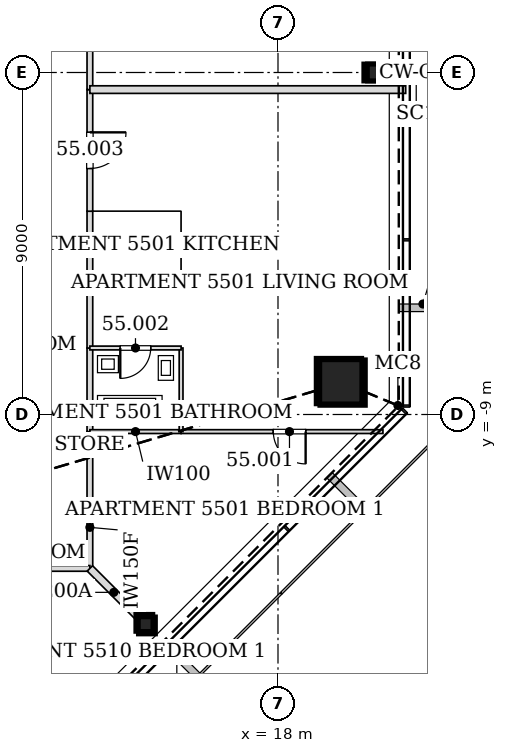
"""IFC4 building model, lengths in metres.
Left out: names, types, materials, properties, quantities, classifications, styles, units other than length and angle.
Written with IfcOpenShell. Run it as: python <this file> out.ifc"""

import sys

from ifc_helpers import new_model, si_unit, direction, frame, frame_2d, origin, origin_2d, place, context, subcontext, project, spatial, rectangle, hollow_rectangle, extrude, element, fill, save


model = new_model("IFC4")
c1 = context("Model", 3, precision=1e-05, world=origin(), true_north=direction((0.0, 1.0)))
c2 = subcontext(c1, "Body", "Model", "MODEL_VIEW")
j1 = project(units=[si_unit("LENGTHUNIT", "METRE"), si_unit("PLANEANGLEUNIT", "RADIAN")], contexts=[c1])
p1 = place(None, origin())
s1 = spatial("IfcSite", under=j1, at=p1, CompositionType="ELEMENT")
p2 = place(p1, origin())
s2 = spatial("IfcBuilding", under=s1, at=p2, CompositionType="ELEMENT")
p3 = place(p2, frame((0.0, 0.0, 234.6)))
s3 = spatial("IfcBuildingStorey", under=s2, at=p3, CompositionType="ELEMENT", Elevation=234.6)
p4 = place(p3, frame((19.7, -8.16, 0.0), z_axis=(-0.02827915051, 0.01169924247, 0.999531598986), x_axis=(-0.382282742426, -0.924045401938, 0.0)))
e1 = element("IfcColumn", 1, at=p4, inside=s3, PredefinedType="COLUMN", context=c2, shape_type="SweptSolid", body=[
    extrude(hollow_rectangle(XDim=1.2, YDim=1.2, WallThickness=0.055, at=origin_2d()), origin(), (0.0, 0.0, 1.0), 3.402),
])
for number, where, z_axis, x_axis in (
    (2, (20.578, 0.0, 0.0), (-0.028, 0.0, 1.0), (0.0, -1.0, 0.0)),
    (3, (14.551, -14.551, 0.0), (-0.02, 0.02, 1.0), (-0.707, -0.707, 0.0)),
):
    element("IfcColumn", number, at=place(p3, frame(where, z_axis=z_axis, x_axis=x_axis)), inside=s3, PredefinedType="COLUMN", context=c2, shape_type="SweptSolid", body=[
        extrude(hollow_rectangle(XDim=0.45, YDim=0.45, WallThickness=0.02, at=origin_2d()), origin(), (0.0, 0.0, 1.0), 3.401),
    ])
p5 = place(p3, frame((13.05, -13.05, 0.0), z_axis=(0.0, 0.0, 1.0), x_axis=(0.0, 1.0, 0.0)))
e4 = element("IfcWall", 4, at=p5, inside=s3, PredefinedType="PARTITIONING", context=c2, shape_type="SweptSolid", body=[
    extrude(rectangle(XDim=3.601, YDim=0.15, at=frame_2d((1.801, 0.0))), origin(), (0.0, 0.0, 1.0), 2.344),
])
p6 = place(p3, frame((13.05, -9.451, 0.0), z_axis=(0.0, 0.0, 1.0), x_axis=(0.0, 1.0, 0.0)))
e5 = element("IfcWall", 5, at=p6, inside=s3, PredefinedType="PARTITIONING", context=c2, shape_type="SweptSolid", body=[
    extrude(rectangle(XDim=2.202, YDim=0.15, at=frame_2d((1.101, 0.0))), origin(), (0.0, 0.0, 1.0), 2.73),
])
for number, where, z_axis, x_axis in (
    (6, (13.05, -5.451, 0.0), (0.0, 0.0, 1.0), (0.0, 1.0, 0.0)),
    (7, (13.05, -7.251, 0.0), (0.0, 0.0, 1.0), (0.0, 1.0, 0.0)),
):
    element("IfcWall", number, at=place(p3, frame(where, z_axis=z_axis, x_axis=x_axis)), inside=s3, PredefinedType="PARTITIONING", context=c2, shape_type="SweptSolid", body=[
        extrude(rectangle(XDim=1.802, YDim=0.15, at=frame_2d((0.901, 0.0))), origin(), (0.0, 0.0, 1.0), 2.73),
    ])
p7 = place(p3, frame((13.05, -3.651, 0.0), z_axis=(0.0, 0.0, 1.0), x_axis=(0.0, 1.0, 0.0)))
e8 = element("IfcWall", 8, at=p7, inside=s3, PredefinedType="PARTITIONING", context=c2, shape_type="SweptSolid", body=[
    extrude(rectangle(XDim=3.202, YDim=0.15, at=frame_2d((1.601, 0.0))), origin(), (0.0, 0.0, 1.0), 2.73),
])
p8 = place(p7, frame((1.126, 0.0, 0.0)))
e9 = element("IfcOpeningElement", 9, at=p8, cuts=e8, PredefinedType="OPENING", context=c2, shape_type="SweptSolid", body=[
    extrude(rectangle(XDim=0.95, YDim=2.1, at=frame_2d((0.475, 1.05))), frame((0.0, 0.085, 0.0), z_axis=(0.0, -1.0, 0.0), x_axis=(1.0, 0.0, 0.0)), (0.0, 0.0, 1.0), 0.17),
])
p9 = place(p3, frame((13.05, -0.451, 0.0), z_axis=(0.0, 0.0, 1.0), x_axis=(0.0, 1.0, 0.0)))
e10 = element("IfcWall", 10, at=p9, inside=s3, PredefinedType="PARTITIONING", context=c2, shape_type="SweptSolid", body=[
    extrude(rectangle(XDim=4.102, YDim=0.15, at=frame_2d((2.051, 0.0))), origin(), (0.0, 0.0, 1.0), 2.331),
])
p10 = place(p3, frame((9.899, -13.05, 0.0), z_axis=(0.0, 0.0, 1.0), x_axis=(1.0, 0.0, 0.0)))
e11 = element("IfcWall", 11, at=p10, inside=s3, PredefinedType="PARTITIONING", context=c2, shape_type="SweptSolid", body=[
    extrude(rectangle(XDim=3.151, YDim=0.15, at=frame_2d((1.576, 0.0))), origin(), (0.0, 0.0, 1.0), 2.344),
])
p11 = place(p3, frame((15.451, -9.45, 0.0), z_axis=(0.0, 0.0, 1.0), x_axis=(-1.0, 0.0, 0.0)))
e12 = element("IfcWall", 12, at=p11, inside=s3, PredefinedType="PARTITIONING", context=c2, shape_type="SweptSolid", body=[
    extrude(rectangle(XDim=2.401, YDim=0.1, at=frame_2d((1.2, 0.0))), origin(), (0.0, 0.0, 1.0), 2.344),
])
p12 = place(p3, frame((20.762, -9.45, 0.0), z_axis=(0.0, 0.0, 1.0), x_axis=(-1.0, 0.0, 0.0)))
e13 = element("IfcWall", 13, at=p12, inside=s3, PredefinedType="PARTITIONING", context=c2, shape_type="SweptSolid", body=[
    extrude(rectangle(XDim=5.313, YDim=0.1, at=frame_2d((2.656, 0.0))), origin(), (0.0, 0.0, 1.0), 2.344),
])
p13 = place(p12, frame((2.034, 0.0, 0.0)))
e14 = element("IfcOpeningElement", 14, at=p13, cuts=e13, PredefinedType="OPENING", context=c2, shape_type="SweptSolid", body=[
    extrude(rectangle(XDim=0.85, YDim=2.1, at=frame_2d((0.425, 1.05))), frame((0.0, 0.06, 0.0), z_axis=(0.0, -1.0, 0.0), x_axis=(1.0, 0.0, 0.0)), (0.0, 0.0, 1.0), 0.12),
])
p14 = place(p3, frame((13.05, -13.05, 0.0), z_axis=(0.0, 0.0, 1.0), x_axis=(0.707106781187, -0.707106781187, 0.0)))
e15 = element("IfcWall", 15, at=p14, inside=s3, PredefinedType="PARTITIONING", context=c2, shape_type="SweptSolid", body=[
    extrude(rectangle(XDim=1.782, YDim=0.2, at=frame_2d((0.891, 0.0))), origin(), (0.0, 0.0, 1.0), 2.583),
])
p15 = place(p3, frame((15.45, -9.45, 0.0), z_axis=(0.0, 0.0, 1.0), x_axis=(0.0, 1.0, 0.0)))
e16 = element("IfcWall", 16, at=p15, inside=s3, PredefinedType="PARTITIONING", context=c2, shape_type="SweptSolid", body=[
    extrude(rectangle(XDim=2.2, YDim=0.1, at=frame_2d((1.1, 0.0))), origin(), (0.0, 0.0, 1.0), 2.344),
])
p16 = place(p3, frame((15.45, -7.25, 0.0), z_axis=(0.0, 0.0, 1.0), x_axis=(-1.0, 0.0, 0.0)))
e17 = element("IfcWall", 17, at=p16, inside=s3, PredefinedType="PARTITIONING", context=c2, shape_type="SweptSolid", body=[
    extrude(rectangle(XDim=2.4, YDim=0.1, at=frame_2d((1.2, 0.0))), origin(), (0.0, 0.0, 1.0), 2.73),
])
p17 = place(p16, frame((0.8, 0.0, 0.0)))
e18 = element("IfcOpeningElement", 18, at=p17, cuts=e17, PredefinedType="OPENING", context=c2, shape_type="SweptSolid", body=[
    extrude(rectangle(XDim=0.8, YDim=2.1, at=frame_2d((0.4, 1.05))), frame((0.0, 0.06, 0.0), z_axis=(0.0, -1.0, 0.0), x_axis=(1.0, 0.0, 0.0)), (0.0, 0.0, 1.0), 0.12),
])
p18 = place(p3, frame((21.36, -0.45, 0.0), z_axis=(0.0, 0.0, 1.0), x_axis=(-1.0, 0.0, 0.0)))
e19 = element("IfcWall", 19, at=p18, inside=s3, PredefinedType="PARTITIONING", context=c2, shape_type="SweptSolid", body=[
    extrude(rectangle(XDim=8.31, YDim=0.2, at=frame_2d((4.155, 0.0))), origin(), (0.0, 0.0, 1.0), 2.662),
])
p19 = place(p13, origin())
e20 = element("IfcDoor", 20, at=p19, inside=s3, OperationType="SINGLE_SWING_LEFT", PredefinedType="DOOR", context=c2, shape_type="SweptSolid", body=[
    extrude(rectangle(XDim=0.85, YDim=2.1, at=frame_2d((0.425, 1.05))), frame((0.0, 0.025, 0.0), z_axis=(0.0, -1.0, 0.0), x_axis=(1.0, 0.0, 0.0)), (0.0, 0.0, 1.0), 0.05),
])
fill(e14, e20)
p20 = place(p17, origin())
e21 = element("IfcDoor", 21, at=p20, inside=s3, OperationType="SINGLE_SWING_RIGHT", PredefinedType="DOOR", context=c2, shape_type="SweptSolid", body=[
    extrude(rectangle(XDim=0.8, YDim=2.1, at=frame_2d((0.4, 1.05))), frame((0.0, 0.025, 0.0), z_axis=(0.0, -1.0, 0.0), x_axis=(1.0, 0.0, 0.0)), (0.0, 0.0, 1.0), 0.05),
])
fill(e18, e21)
p21 = place(p8, frame((0.95, 0.0, 0.0), z_axis=(0.0, 0.0, 1.0), x_axis=(-1.0, 0.0, 0.0)))
e22 = element("IfcDoor", 22, at=p21, inside=s3, OperationType="SINGLE_SWING_LEFT", PredefinedType="DOOR", context=c2, shape_type="SweptSolid", body=[
    extrude(rectangle(XDim=0.95, YDim=2.1, at=frame_2d((0.475, 1.05))), frame((0.0, 0.025, 0.0), z_axis=(0.0, -1.0, 0.0), x_axis=(1.0, 0.0, 0.0)), (0.0, 0.0, 1.0), 0.05),
])
fill(e9, e22)
save(model, sys.argv[1])
